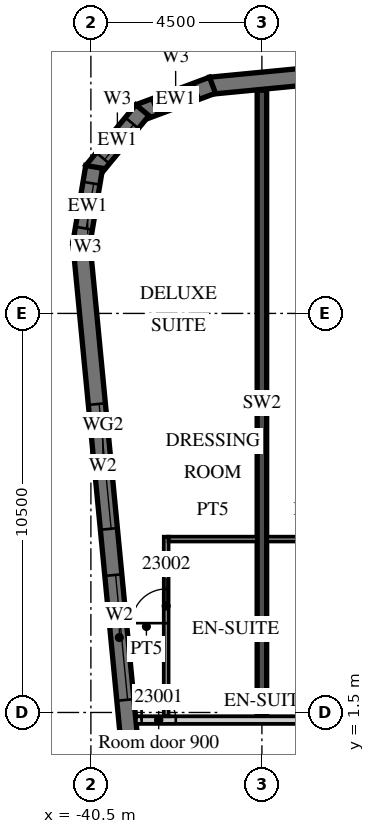
"""IFC4 building model, lengths in metres.
Left out: names, types, materials, properties, quantities, classifications, styles, units other than length and angle.
Written with IfcOpenShell. Run it as: python <this file> out.ifc"""

import sys

from ifc_helpers import new_model, si_unit, direction, frame, frame_2d, origin, place, context, subcontext, project, spatial, polyline, rectangle, outline, extrude, element, fill, save


model = new_model("IFC4")
c1 = context("Model", 3, precision=1e-05, world=origin(), true_north=direction((0.0, 1.0)))
c2 = subcontext(c1, "Body", "Model", "MODEL_VIEW")
j1 = project(units=[si_unit("LENGTHUNIT", "METRE"), si_unit("PLANEANGLEUNIT", "RADIAN")], contexts=[c1])
p1 = place(None, origin())
s1 = spatial("IfcSite", under=j1, at=p1, CompositionType="ELEMENT")
p2 = place(p1, origin())
s2 = spatial("IfcBuilding", under=s1, at=p2, CompositionType="ELEMENT")
p3 = place(p2, frame((0.0, 0.0, 110.8)))
s3 = spatial("IfcBuildingStorey", under=s2, at=p3, CompositionType="ELEMENT", Elevation=110.8)
p4 = place(p3, frame((-36.0, 1.4, 0.0), z_axis=(0.0, 0.0, 1.0), x_axis=(0.0, 1.0, 0.0)))
e1 = element("IfcWall", 1, at=p4, inside=s3, PredefinedType="SHEAR", context=c2, shape_type="SweptSolid", body=[
    extrude(rectangle(XDim=16.474, YDim=0.25, at=frame_2d((8.237, 0.0))), origin(), (0.0, 0.0, 1.0), 3.3),
])
p5 = place(p3, frame((-40.753, 13.872, 0.0), z_axis=(0.0, 0.0, 1.0), x_axis=(0.095843327381, -0.995396431878, 0.0)))
e2 = element("IfcWall", 2, at=p5, inside=s3, PredefinedType="SOLIDWALL", context=c2, shape_type="SweptSolid", body=[
    extrude(rectangle(XDim=35.0, YDim=0.45, at=frame_2d((17.5, 0.0))), origin(), (0.0, 0.0, 1.0), 3.02),
])
p6 = place(p5, frame((4.277, 0.0, 0.45)))
e3 = element("IfcOpeningElement", 3, at=p6, cuts=e2, PredefinedType="OPENING", context=c2, shape_type="SweptSolid", body=[
    extrude(rectangle(XDim=3.3, YDim=2.25, at=frame_2d((1.65, 1.125))), frame((0.0, 0.235, 0.0), z_axis=(0.0, -1.0, 0.0), x_axis=(1.0, 0.0, 0.0)), (0.0, 0.0, 1.0), 0.47),
])
p7 = place(p5, frame((8.798, 0.0, 0.45)))
e4 = element("IfcOpeningElement", 4, at=p7, cuts=e2, PredefinedType="OPENING", context=c2, shape_type="SweptSolid", body=[
    extrude(rectangle(XDim=3.3, YDim=2.25, at=frame_2d((1.65, 1.125))), frame((0.0, 0.235, 0.0), z_axis=(0.0, -1.0, 0.0), x_axis=(1.0, 0.0, 0.0)), (0.0, 0.0, 1.0), 0.47),
])
p8 = place(p3, frame((13.521, 22.89, 0.0), z_axis=(0.0, 0.0, 1.0), x_axis=(-0.995396445054, -0.095843190545, 0.0)))
e5 = element("IfcWall", 5, at=p8, inside=s3, PredefinedType="SOLIDWALL", context=c2, shape_type="SweptSolid", body=[
    extrude(rectangle(XDim=51.114, YDim=0.45, at=frame_2d((25.557, 0.0))), origin(), (0.0, 0.0, 1.0), 3.02),
])
p9 = place(p8, frame((0.91, 0.0, 0.45)))
e6 = element("IfcOpeningElement", 6, at=p9, cuts=e5, PredefinedType="OPENING", context=c2, shape_type="SweptSolid", body=[
    extrude(rectangle(XDim=2.7, YDim=2.25, at=frame_2d((1.35, 1.125))), frame((0.0, 0.235, 0.0), z_axis=(0.0, -1.0, 0.0), x_axis=(1.0, 0.0, 0.0)), (0.0, 0.0, 1.0), 0.47),
])
p10 = place(p8, frame((5.431, 0.0, 0.45)))
e7 = element("IfcOpeningElement", 7, at=p10, cuts=e5, PredefinedType="OPENING", context=c2, shape_type="SweptSolid", body=[
    extrude(rectangle(XDim=2.7, YDim=2.25, at=frame_2d((1.35, 1.125))), frame((0.0, 0.235, 0.0), z_axis=(0.0, -1.0, 0.0), x_axis=(1.0, 0.0, 0.0)), (0.0, 0.0, 1.0), 0.47),
])
p11 = place(p8, frame((9.952, 0.0, 0.45)))
e8 = element("IfcOpeningElement", 8, at=p11, cuts=e5, PredefinedType="OPENING", context=c2, shape_type="SweptSolid", body=[
    extrude(rectangle(XDim=2.7, YDim=2.25, at=frame_2d((1.35, 1.125))), frame((0.0, 0.235, 0.0), z_axis=(0.0, -1.0, 0.0), x_axis=(1.0, 0.0, 0.0)), (0.0, 0.0, 1.0), 0.47),
])
p12 = place(p8, frame((14.473, 0.0, 0.45)))
e9 = element("IfcOpeningElement", 9, at=p12, cuts=e5, PredefinedType="OPENING", context=c2, shape_type="SweptSolid", body=[
    extrude(rectangle(XDim=2.7, YDim=2.25, at=frame_2d((1.35, 1.125))), frame((0.0, 0.235, 0.0), z_axis=(0.0, -1.0, 0.0), x_axis=(1.0, 0.0, 0.0)), (0.0, 0.0, 1.0), 0.47),
])
p13 = place(p8, frame((18.994, 0.0, 0.45)))
e10 = element("IfcOpeningElement", 10, at=p13, cuts=e5, PredefinedType="OPENING", context=c2, shape_type="SweptSolid", body=[
    extrude(rectangle(XDim=2.7, YDim=2.25, at=frame_2d((1.35, 1.125))), frame((0.0, 0.235, 0.0), z_axis=(0.0, -1.0, 0.0), x_axis=(1.0, 0.0, 0.0)), (0.0, 0.0, 1.0), 0.47),
])
p14 = place(p8, frame((23.514, 0.0, 0.45)))
e11 = element("IfcOpeningElement", 11, at=p14, cuts=e5, PredefinedType="OPENING", context=c2, shape_type="SweptSolid", body=[
    extrude(rectangle(XDim=2.7, YDim=2.25, at=frame_2d((1.35, 1.125))), frame((0.0, 0.235, 0.0), z_axis=(0.0, -1.0, 0.0), x_axis=(1.0, 0.0, 0.0)), (0.0, 0.0, 1.0), 0.47),
])
p15 = place(p8, frame((28.035, 0.0, 0.45)))
e12 = element("IfcOpeningElement", 12, at=p15, cuts=e5, PredefinedType="OPENING", context=c2, shape_type="SweptSolid", body=[
    extrude(rectangle(XDim=2.7, YDim=2.25, at=frame_2d((1.35, 1.125))), frame((0.0, 0.235, 0.0), z_axis=(0.0, -1.0, 0.0), x_axis=(1.0, 0.0, 0.0)), (0.0, 0.0, 1.0), 0.47),
])
p16 = place(p8, frame((32.556, 0.0, 0.45)))
e13 = element("IfcOpeningElement", 13, at=p16, cuts=e5, PredefinedType="OPENING", context=c2, shape_type="SweptSolid", body=[
    extrude(rectangle(XDim=2.7, YDim=2.25, at=frame_2d((1.35, 1.125))), frame((0.0, 0.235, 0.0), z_axis=(0.0, -1.0, 0.0), x_axis=(1.0, 0.0, 0.0)), (0.0, 0.0, 1.0), 0.47),
])
p17 = place(p8, frame((37.077, 0.0, 0.45)))
e14 = element("IfcOpeningElement", 14, at=p17, cuts=e5, PredefinedType="OPENING", context=c2, shape_type="SweptSolid", body=[
    extrude(rectangle(XDim=2.7, YDim=2.25, at=frame_2d((1.35, 1.125))), frame((0.0, 0.235, 0.0), z_axis=(0.0, -1.0, 0.0), x_axis=(1.0, 0.0, 0.0)), (0.0, 0.0, 1.0), 0.47),
])
p18 = place(p8, frame((41.598, 0.0, 0.45)))
e15 = element("IfcOpeningElement", 15, at=p18, cuts=e5, PredefinedType="OPENING", context=c2, shape_type="SweptSolid", body=[
    extrude(rectangle(XDim=2.7, YDim=2.25, at=frame_2d((1.35, 1.125))), frame((0.0, 0.235, 0.0), z_axis=(0.0, -1.0, 0.0), x_axis=(1.0, 0.0, 0.0)), (0.0, 0.0, 1.0), 0.47),
])
p19 = place(p8, frame((46.118, 0.0, 0.45)))
e16 = element("IfcOpeningElement", 16, at=p19, cuts=e5, PredefinedType="OPENING", context=c2, shape_type="SweptSolid", body=[
    extrude(rectangle(XDim=2.7, YDim=2.25, at=frame_2d((1.35, 1.125))), frame((0.0, 0.235, 0.0), z_axis=(0.0, -1.0, 0.0), x_axis=(1.0, 0.0, 0.0)), (0.0, 0.0, 1.0), 0.47),
])
p20 = place(p3, frame((-37.3, 18.004, 0.0), z_axis=(0.0, 0.0, 1.0), x_axis=(-0.936677599948, -0.350192909346, 0.0)))
e17 = element("IfcWall", 17, at=p20, inside=s3, PredefinedType="SOLIDWALL", context=c2, shape_type="SweptSolid", body=[
    extrude(outline(polyline([(0.0, -0.225), (2.071, -0.225), (1.95, 0.225), (0.121, 0.225), (0.0, -0.225)])), origin(), (0.0, 0.0, 1.0), 3.02),
])
p21 = place(p20, frame((0.435, 0.0, 0.45)))
e18 = element("IfcOpeningElement", 18, at=p21, cuts=e17, PredefinedType="OPENING", context=c2, shape_type="SweptSolid", body=[
    extrude(rectangle(XDim=1.2, YDim=2.25, at=frame_2d((0.6, 1.125))), frame((0.0, 0.235, 0.0), z_axis=(0.0, -1.0, 0.0), x_axis=(1.0, 0.0, 0.0)), (0.0, 0.0, 1.0), 0.47),
])
p22 = place(p3, frame((-39.145, 17.347, 0.0), z_axis=(0.0, 0.0, 1.0), x_axis=(-0.636046112757, -0.771651049663, 0.0)))
e19 = element("IfcWall", 19, at=p22, inside=s3, PredefinedType="SOLIDWALL", context=c2, shape_type="SweptSolid", body=[
    extrude(outline(polyline([(0.0, -0.225), (2.071, -0.225), (1.95, 0.225), (0.121, 0.225), (0.0, -0.225)])), origin(), (0.0, 0.0, 1.0), 3.02),
])
p23 = place(p22, frame((0.435, 0.0, 0.45)))
e20 = element("IfcOpeningElement", 20, at=p23, cuts=e19, PredefinedType="OPENING", context=c2, shape_type="SweptSolid", body=[
    extrude(rectangle(XDim=1.2, YDim=2.25, at=frame_2d((0.6, 1.125))), frame((0.0, 0.235, 0.0), z_axis=(0.0, -1.0, 0.0), x_axis=(1.0, 0.0, 0.0)), (0.0, 0.0, 1.0), 0.47),
])
p24 = place(p3, frame((-40.413, 15.855, 0.0), z_axis=(0.0, 0.0, 1.0), x_axis=(-0.165068144653, -0.986282164302, 0.0)))
e21 = element("IfcWall", 21, at=p24, inside=s3, PredefinedType="SOLIDWALL", context=c2, shape_type="SweptSolid", body=[
    extrude(outline(polyline([(0.0, -0.225), (2.071, -0.225), (1.95, 0.225), (0.121, 0.225), (0.0, -0.225)])), origin(), (0.0, 0.0, 1.0), 3.02),
])
p25 = place(p24, frame((0.435, 0.0, 0.45)))
e22 = element("IfcOpeningElement", 22, at=p25, cuts=e21, PredefinedType="OPENING", context=c2, shape_type="SweptSolid", body=[
    extrude(rectangle(XDim=1.2, YDim=2.25, at=frame_2d((0.6, 1.125))), frame((0.0, 0.235, 0.0), z_axis=(0.0, -1.0, 0.0), x_axis=(1.0, 0.0, 0.0)), (0.0, 0.0, 1.0), 0.47),
])
p26 = place(p3, frame((-39.316, 1.3, 0.0), z_axis=(0.0, 0.0, 1.0), x_axis=(1.0, 0.0, 0.0)))
e23 = element("IfcWall", 23, at=p26, inside=s3, PredefinedType="PARTITIONING", context=c2, shape_type="SweptSolid", body=[
    extrude(rectangle(XDim=52.816, YDim=0.2, at=frame_2d((26.408, 0.0))), origin(), (0.0, 0.0, 1.0), 3.02),
])
p27 = place(p26, frame((0.15, 0.0, 0.0)))
e24 = element("IfcOpeningElement", 24, at=p27, cuts=e23, PredefinedType="OPENING", context=c2, shape_type="SweptSolid", body=[
    extrude(rectangle(XDim=0.9, YDim=2.1, at=frame_2d((0.45, 1.05))), frame((0.0, 0.11, 0.0), z_axis=(0.0, -1.0, 0.0), x_axis=(1.0, 0.0, 0.0)), (0.0, 0.0, 1.0), 0.22),
])
p28 = place(p26, frame((6.266, 0.0, 0.0)))
e25 = element("IfcOpeningElement", 25, at=p28, cuts=e23, PredefinedType="OPENING", context=c2, shape_type="SweptSolid", body=[
    extrude(rectangle(XDim=1.0, YDim=2.1, at=frame_2d((0.5, 1.05))), frame((0.0, 0.11, 0.0), z_axis=(0.0, -1.0, 0.0), x_axis=(1.0, 0.0, 0.0)), (0.0, 0.0, 1.0), 0.22),
])
p29 = place(p26, frame((10.741, 0.0, 0.0)))
e26 = element("IfcOpeningElement", 26, at=p29, cuts=e23, PredefinedType="OPENING", context=c2, shape_type="SweptSolid", body=[
    extrude(rectangle(XDim=1.0, YDim=2.1, at=frame_2d((0.5, 1.05))), frame((0.0, 0.11, 0.0), z_axis=(0.0, -1.0, 0.0), x_axis=(1.0, 0.0, 0.0)), (0.0, 0.0, 1.0), 0.22),
])
p30 = place(p26, frame((17.678, 0.0, 0.0)))
e27 = element("IfcOpeningElement", 27, at=p30, cuts=e23, PredefinedType="OPENING", context=c2, shape_type="SweptSolid", body=[
    extrude(rectangle(XDim=1.2, YDim=2.1, at=frame_2d((0.6, 1.05))), frame((0.0, 0.11, 0.0), z_axis=(0.0, -1.0, 0.0), x_axis=(1.0, 0.0, 0.0)), (0.0, 0.0, 1.0), 0.22),
])
p31 = place(p26, frame((26.678, 0.0, 0.0)))
e28 = element("IfcOpeningElement", 28, at=p31, cuts=e23, PredefinedType="OPENING", context=c2, shape_type="SweptSolid", body=[
    extrude(rectangle(XDim=1.2, YDim=2.1, at=frame_2d((0.6, 1.05))), frame((0.0, 0.11, 0.0), z_axis=(0.0, -1.0, 0.0), x_axis=(1.0, 0.0, 0.0)), (0.0, 0.0, 1.0), 0.22),
])
p32 = place(p26, frame((35.678, 0.0, 0.0)))
e29 = element("IfcOpeningElement", 29, at=p32, cuts=e23, PredefinedType="OPENING", context=c2, shape_type="SweptSolid", body=[
    extrude(rectangle(XDim=1.2, YDim=2.1, at=frame_2d((0.6, 1.05))), frame((0.0, 0.11, 0.0), z_axis=(0.0, -1.0, 0.0), x_axis=(1.0, 0.0, 0.0)), (0.0, 0.0, 1.0), 0.22),
])
p33 = place(p26, frame((41.754, 0.0, 0.0)))
e30 = element("IfcOpeningElement", 30, at=p33, cuts=e23, PredefinedType="OPENING", context=c2, shape_type="SweptSolid", body=[
    extrude(rectangle(XDim=1.2, YDim=2.1, at=frame_2d((0.6, 1.05))), frame((0.0, 0.11, 0.0), z_axis=(0.0, -1.0, 0.0), x_axis=(1.0, 0.0, 0.0)), (0.0, 0.0, 1.0), 0.22),
])
p34 = place(p26, frame((51.241, 0.0, 0.0)))
e31 = element("IfcOpeningElement", 31, at=p34, cuts=e23, PredefinedType="OPENING", context=c2, shape_type="SweptSolid", body=[
    extrude(rectangle(XDim=1.0, YDim=2.1, at=frame_2d((0.5, 1.05))), frame((0.0, 0.11, 0.0), z_axis=(0.0, -1.0, 0.0), x_axis=(1.0, 0.0, 0.0)), (0.0, 0.0, 1.0), 0.22),
])
p35 = place(p3, frame((-38.519, 1.4, 0.0), z_axis=(0.0, 0.0, 1.0), x_axis=(0.0, 1.0, 0.0)))
e32 = element("IfcWall", 32, at=p35, inside=s3, PredefinedType="PARTITIONING", context=c2, shape_type="SweptSolid", body=[
    extrude(rectangle(XDim=4.725, YDim=0.125, at=frame_2d((2.363, 0.0))), origin(), (0.0, 0.0, 1.0), 3.02),
])
p36 = place(p35, frame((2.45, 0.0, 0.0)))
e33 = element("IfcOpeningElement", 33, at=p36, cuts=e32, PredefinedType="OPENING", context=c2, shape_type="SweptSolid", body=[
    extrude(rectangle(XDim=0.9, YDim=2.1, at=frame_2d((0.45, 1.05))), frame((0.0, 0.073, 0.0), z_axis=(0.0, -1.0, 0.0), x_axis=(1.0, 0.0, 0.0)), (0.0, 0.0, 1.0), 0.145),
])
p37 = place(p3, frame((-38.457, 6.062, 0.0), z_axis=(0.0, 0.0, 1.0), x_axis=(1.0, 0.0, 0.0)))
e34 = element("IfcWall", 34, at=p37, inside=s3, PredefinedType="PARTITIONING", context=c2, shape_type="SweptSolid", body=[
    extrude(rectangle(XDim=2.332, YDim=0.125, at=frame_2d((1.166, 0.0))), origin(), (0.0, 0.0, 1.0), 3.02),
])
p38 = place(p3, frame((-35.875, 6.062, 0.0), z_axis=(0.0, 0.0, 1.0), x_axis=(1.0, 0.0, 0.0)))
e35 = element("IfcWall", 35, at=p38, inside=s3, PredefinedType="PARTITIONING", context=c2, shape_type="SweptSolid", body=[
    extrude(rectangle(XDim=2.25, YDim=0.125, at=frame_2d((1.125, 0.0))), origin(), (0.0, 0.0, 1.0), 3.02),
])
p39 = place(p6, origin())
e36 = element("IfcWindow", 36, at=p39, inside=s3, PartitioningType="SINGLE_PANEL", PredefinedType="WINDOW", context=c2, shape_type="SweptSolid", body=[
    extrude(rectangle(XDim=3.3, YDim=2.25, at=frame_2d((1.65, 1.125))), frame((0.0, 0.09, 0.0), z_axis=(0.0, -1.0, 0.0), x_axis=(1.0, 0.0, 0.0)), (0.0, 0.0, 1.0), 0.06),
])
fill(e3, e36)
p40 = place(p7, origin())
e37 = element("IfcWindow", 37, at=p40, inside=s3, PartitioningType="SINGLE_PANEL", PredefinedType="WINDOW", context=c2, shape_type="SweptSolid", body=[
    extrude(rectangle(XDim=3.3, YDim=2.25, at=frame_2d((1.65, 1.125))), frame((0.0, 0.09, 0.0), z_axis=(0.0, -1.0, 0.0), x_axis=(1.0, 0.0, 0.0)), (0.0, 0.0, 1.0), 0.06),
])
fill(e4, e37)
p41 = place(p21, origin())
e38 = element("IfcWindow", 38, at=p41, inside=s3, PartitioningType="SINGLE_PANEL", PredefinedType="WINDOW", context=c2, shape_type="SweptSolid", body=[
    extrude(rectangle(XDim=1.2, YDim=2.25, at=frame_2d((0.6, 1.125))), frame((0.0, 0.09, 0.0), z_axis=(0.0, -1.0, 0.0), x_axis=(1.0, 0.0, 0.0)), (0.0, 0.0, 1.0), 0.06),
])
fill(e18, e38)
p42 = place(p23, origin())
e39 = element("IfcWindow", 39, at=p42, inside=s3, PartitioningType="SINGLE_PANEL", PredefinedType="WINDOW", context=c2, shape_type="SweptSolid", body=[
    extrude(rectangle(XDim=1.2, YDim=2.25, at=frame_2d((0.6, 1.125))), frame((0.0, 0.09, 0.0), z_axis=(0.0, -1.0, 0.0), x_axis=(1.0, 0.0, 0.0)), (0.0, 0.0, 1.0), 0.06),
])
fill(e20, e39)
p43 = place(p25, origin())
e40 = element("IfcWindow", 40, at=p43, inside=s3, PartitioningType="SINGLE_PANEL", PredefinedType="WINDOW", context=c2, shape_type="SweptSolid", body=[
    extrude(rectangle(XDim=1.2, YDim=2.25, at=frame_2d((0.6, 1.125))), frame((0.0, 0.09, 0.0), z_axis=(0.0, -1.0, 0.0), x_axis=(1.0, 0.0, 0.0)), (0.0, 0.0, 1.0), 0.06),
])
fill(e22, e40)
p44 = place(p27, origin())
e41 = element("IfcDoor", 41, at=p44, inside=s3, OperationType="SINGLE_SWING_LEFT", PredefinedType="DOOR", context=c2, shape_type="SweptSolid", body=[
    extrude(rectangle(XDim=0.9, YDim=2.1, at=frame_2d((0.45, 1.05))), frame((0.0, 0.025, 0.0), z_axis=(0.0, -1.0, 0.0), x_axis=(1.0, 0.0, 0.0)), (0.0, 0.0, 1.0), 0.05),
])
fill(e24, e41)
p45 = place(p36, origin())
e42 = element("IfcDoor", 42, at=p45, inside=s3, OperationType="SINGLE_SWING_LEFT", PredefinedType="DOOR", context=c2, shape_type="SweptSolid", body=[
    extrude(rectangle(XDim=0.9, YDim=2.1, at=frame_2d((0.45, 1.05))), frame((0.0, 0.025, 0.0), z_axis=(0.0, -1.0, 0.0), x_axis=(1.0, 0.0, 0.0)), (0.0, 0.0, 1.0), 0.05),
])
fill(e33, e42)
save(model, sys.argv[1])
